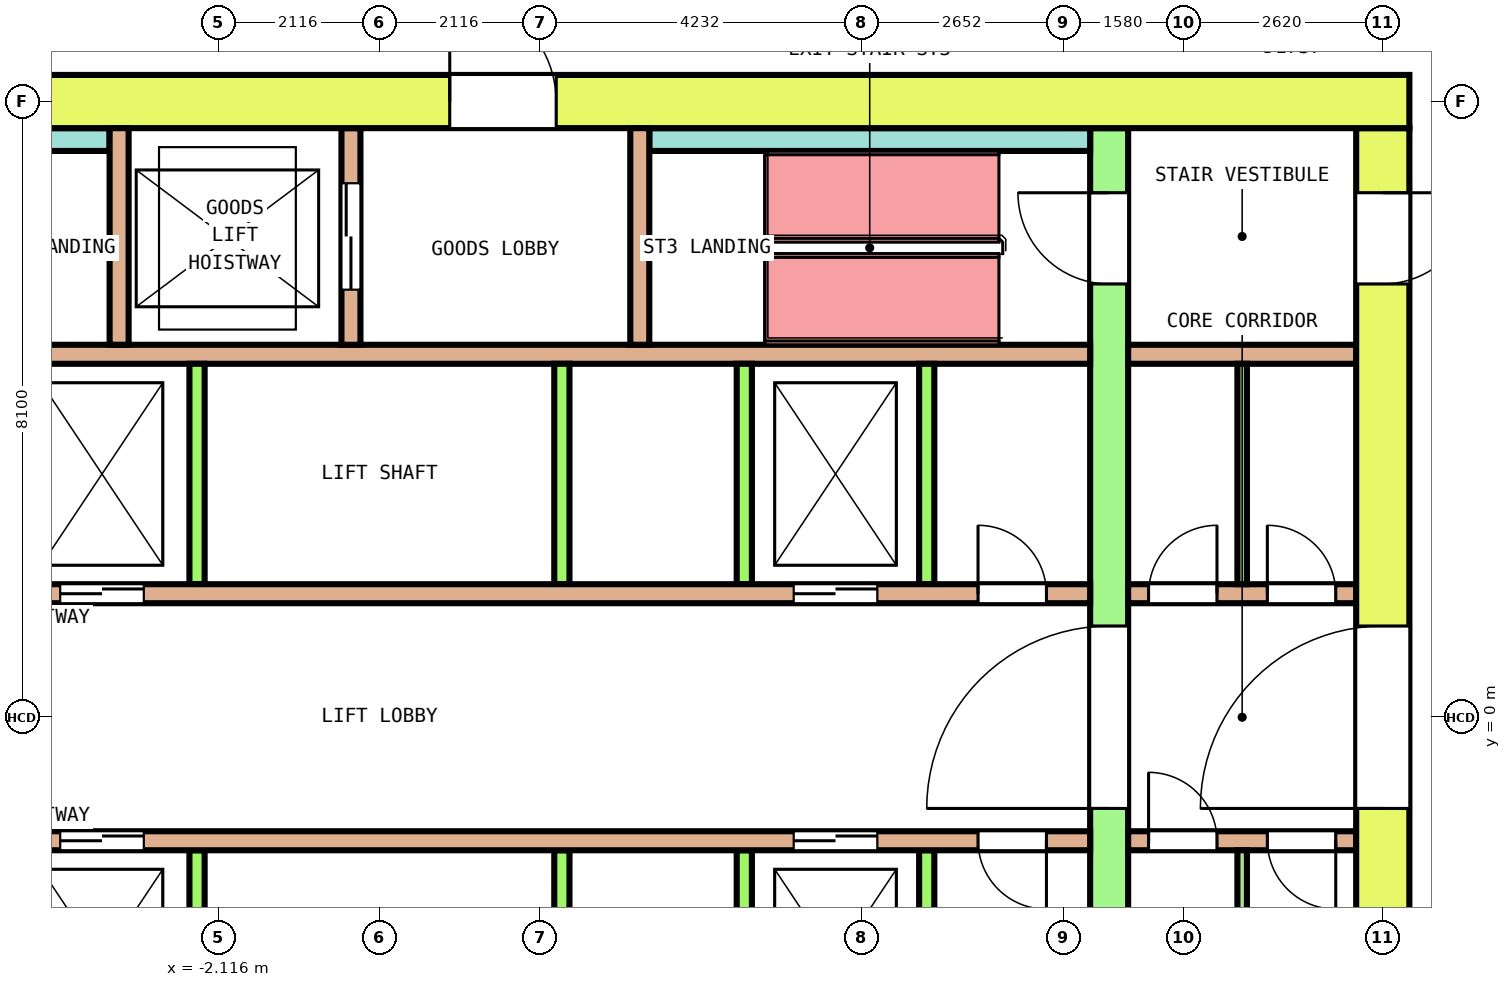
"""IFC4 building model, lengths in metres.
Left out: names, types, materials, properties, quantities, classifications, styles, units other than length and angle.
Written with IfcOpenShell. Run it as: python <this file> out.ifc"""

import sys

from ifc_helpers import new_model, si_unit, direction, frame, frame_2d, origin, place, context, subcontext, project, spatial, rectangle, extrude, element, fill, save


model = new_model("IFC4")
c1 = context("Model", 3, precision=1e-05, world=origin(), true_north=direction((0.0, 1.0)))
c2 = subcontext(c1, "Body", "Model", "MODEL_VIEW")
j1 = project(units=[si_unit("LENGTHUNIT", "METRE"), si_unit("PLANEANGLEUNIT", "RADIAN")], contexts=[c1])
p1 = place(None, origin())
s1 = spatial("IfcSite", under=j1, at=p1, CompositionType="ELEMENT")
p2 = place(p1, origin())
s2 = spatial("IfcBuilding", under=s1, at=p2, CompositionType="ELEMENT")
p3 = place(p2, frame((0.0, 0.0, 158.4)))
s3 = spatial("IfcBuildingStorey", under=s2, at=p3, CompositionType="ELEMENT", Elevation=158.4)
p4 = place(p3, frame((-13.55, 8.1, 0.0), z_axis=(0.0, 0.0, 1.0), x_axis=(1.0, 0.0, 0.0)))
e1 = element("IfcWall", 1, at=p4, inside=s3, PredefinedType="SHEAR", context=c2, shape_type="SweptSolid", body=[
    extrude(rectangle(XDim=27.1, YDim=0.7, at=frame_2d((13.55, 0.0))), origin(), (0.0, 0.0, 1.0), 4.1),
])
p5 = place(p4, frame((14.475, 0.0, 0.0)))
e2 = element("IfcOpeningElement", 2, at=p5, cuts=e1, PredefinedType="OPENING", context=c2, shape_type="SweptSolid", body=[
    extrude(rectangle(XDim=1.4, YDim=2.1, at=frame_2d((0.7, 1.05))), frame((0.0, 0.36, 0.0), z_axis=(0.0, -1.0, 0.0), x_axis=(1.0, 0.0, 0.0)), (0.0, 0.0, 1.0), 0.72),
])
p6 = place(p3, frame((13.2, -7.75, 0.0), z_axis=(0.0, 0.0, 1.0), x_axis=(0.0, 1.0, 0.0)))
e3 = element("IfcWall", 3, at=p6, inside=s3, PredefinedType="SHEAR", context=c2, shape_type="SweptSolid", body=[
    extrude(rectangle(XDim=15.5, YDim=0.7, at=frame_2d((7.75, 0.0))), origin(), (0.0, 0.0, 1.0), 4.1),
])
p7 = place(p6, frame((6.55, 0.0, 0.0)))
e4 = element("IfcOpeningElement", 4, at=p7, cuts=e3, PredefinedType="OPENING", context=c2, shape_type="SweptSolid", body=[
    extrude(rectangle(XDim=2.4, YDim=2.1, at=frame_2d((1.2, 1.05))), frame((0.0, 0.36, 0.0), z_axis=(0.0, -1.0, 0.0), x_axis=(1.0, 0.0, 0.0)), (0.0, 0.0, 1.0), 0.72),
])
p8 = place(p6, frame((13.45, 0.0, 0.0)))
e5 = element("IfcOpeningElement", 5, at=p8, cuts=e3, PredefinedType="OPENING", context=c2, shape_type="SweptSolid", body=[
    extrude(rectangle(XDim=1.2, YDim=2.1, at=frame_2d((0.6, 1.05))), frame((0.0, 0.36, 0.0), z_axis=(0.0, -1.0, 0.0), x_axis=(1.0, 0.0, 0.0)), (0.0, 0.0, 1.0), 0.72),
])
p9 = place(p6, frame((0.95, 0.0, 0.0)))
e6 = element("IfcOpeningElement", 6, at=p9, cuts=e3, PredefinedType="OPENING", context=c2, shape_type="SweptSolid", body=[
    extrude(rectangle(XDim=1.0, YDim=2.1, at=frame_2d((0.5, 1.05))), frame((0.0, 0.36, 0.0), z_axis=(0.0, -1.0, 0.0), x_axis=(1.0, 0.0, 0.0)), (0.0, 0.0, 1.0), 0.72),
])
p10 = place(p3, frame((9.6, -7.75, 0.0), z_axis=(0.0, 0.0, 1.0), x_axis=(0.0, 1.0, 0.0)))
e7 = element("IfcWall", 7, at=p10, inside=s3, PredefinedType="SHEAR", context=c2, shape_type="SweptSolid", body=[
    extrude(rectangle(XDim=15.5, YDim=0.5, at=frame_2d((7.75, 0.0))), origin(), (0.0, 0.0, 1.0), 4.1),
])
p11 = place(p10, frame((6.55, 0.0, 0.0)))
e8 = element("IfcOpeningElement", 8, at=p11, cuts=e7, PredefinedType="OPENING", context=c2, shape_type="SweptSolid", body=[
    extrude(rectangle(XDim=2.4, YDim=2.1, at=frame_2d((1.2, 1.05))), frame((0.0, 0.26, 0.0), z_axis=(0.0, -1.0, 0.0), x_axis=(1.0, 0.0, 0.0)), (0.0, 0.0, 1.0), 0.52),
])
p12 = place(p10, frame((13.45, 0.0, 0.0)))
e9 = element("IfcOpeningElement", 9, at=p12, cuts=e7, PredefinedType="OPENING", context=c2, shape_type="SweptSolid", body=[
    extrude(rectangle(XDim=1.2, YDim=2.1, at=frame_2d((0.6, 1.05))), frame((0.0, 0.26, 0.0), z_axis=(0.0, -1.0, 0.0), x_axis=(1.0, 0.0, 0.0)), (0.0, 0.0, 1.0), 0.52),
])
p13 = place(p10, frame((0.95, 0.0, 0.0)))
e10 = element("IfcOpeningElement", 10, at=p13, cuts=e7, PredefinedType="OPENING", context=c2, shape_type="SweptSolid", body=[
    extrude(rectangle(XDim=1.0, YDim=2.1, at=frame_2d((0.5, 1.05))), frame((0.0, 0.26, 0.0), z_axis=(0.0, -1.0, 0.0), x_axis=(1.0, 0.0, 0.0)), (0.0, 0.0, 1.0), 0.52),
])
p14 = place(p3, frame((-9.35, 1.625, 0.0), z_axis=(0.0, 0.0, 1.0), x_axis=(1.0, 0.0, 0.0)))
e11 = element("IfcWall", 11, at=p14, inside=s3, PredefinedType="SOLIDWALL", context=c2, shape_type="SweptSolid", body=[
    extrude(rectangle(XDim=18.7, YDim=0.25, at=frame_2d((9.35, 0.0))), origin(), (0.0, 0.0, 1.0), 4.1),
])
p15 = place(p14, frame((2.85, 0.0, 0.0)))
e12 = element("IfcOpeningElement", 12, at=p15, cuts=e11, PredefinedType="OPENING", context=c2, shape_type="SweptSolid", body=[
    extrude(rectangle(XDim=1.1, YDim=2.1, at=frame_2d((0.55, 1.05))), frame((0.0, 0.135, 0.0), z_axis=(0.0, -1.0, 0.0), x_axis=(1.0, 0.0, 0.0)), (0.0, 0.0, 1.0), 0.27),
])
p16 = place(p14, frame((5.15, 0.0, 0.0)))
e13 = element("IfcOpeningElement", 13, at=p16, cuts=e11, PredefinedType="OPENING", context=c2, shape_type="SweptSolid", body=[
    extrude(rectangle(XDim=1.1, YDim=2.1, at=frame_2d((0.55, 1.05))), frame((0.0, 0.135, 0.0), z_axis=(0.0, -1.0, 0.0), x_axis=(1.0, 0.0, 0.0)), (0.0, 0.0, 1.0), 0.27),
])
p17 = place(p14, frame((14.8, 0.0, 0.0)))
e14 = element("IfcOpeningElement", 14, at=p17, cuts=e11, PredefinedType="OPENING", context=c2, shape_type="SweptSolid", body=[
    extrude(rectangle(XDim=1.1, YDim=2.1, at=frame_2d((0.55, 1.05))), frame((0.0, 0.135, 0.0), z_axis=(0.0, -1.0, 0.0), x_axis=(1.0, 0.0, 0.0)), (0.0, 0.0, 1.0), 0.27),
])
p18 = place(p14, frame((0.575, 0.0, 0.0)))
e15 = element("IfcOpeningElement", 15, at=p18, cuts=e11, PredefinedType="OPENING", context=c2, shape_type="SweptSolid", body=[
    extrude(rectangle(XDim=0.9, YDim=2.1, at=frame_2d((0.45, 1.05))), frame((0.0, 0.135, 0.0), z_axis=(0.0, -1.0, 0.0), x_axis=(1.0, 0.0, 0.0)), (0.0, 0.0, 1.0), 0.27),
])
p19 = place(p14, frame((17.225, 0.0, 0.0)))
e16 = element("IfcOpeningElement", 16, at=p19, cuts=e11, PredefinedType="OPENING", context=c2, shape_type="SweptSolid", body=[
    extrude(rectangle(XDim=0.9, YDim=2.1, at=frame_2d((0.45, 1.05))), frame((0.0, 0.135, 0.0), z_axis=(0.0, -1.0, 0.0), x_axis=(1.0, 0.0, 0.0)), (0.0, 0.0, 1.0), 0.27),
])
p20 = place(p3, frame((9.85, 1.625, 0.0), z_axis=(0.0, 0.0, 1.0), x_axis=(1.0, 0.0, 0.0)))
e17 = element("IfcWall", 17, at=p20, inside=s3, PredefinedType="SOLIDWALL", context=c2, shape_type="SweptSolid", body=[
    extrude(rectangle(XDim=3.0, YDim=0.25, at=frame_2d((1.5, 0.0))), origin(), (0.0, 0.0, 1.0), 4.1),
])
p21 = place(p20, frame((0.269, 0.0, 0.0)))
e18 = element("IfcOpeningElement", 18, at=p21, cuts=e17, PredefinedType="OPENING", context=c2, shape_type="SweptSolid", body=[
    extrude(rectangle(XDim=0.9, YDim=2.1, at=frame_2d((0.45, 1.05))), frame((0.0, 0.135, 0.0), z_axis=(0.0, -1.0, 0.0), x_axis=(1.0, 0.0, 0.0)), (0.0, 0.0, 1.0), 0.27),
])
p22 = place(p20, frame((1.831, 0.0, 0.0)))
e19 = element("IfcOpeningElement", 19, at=p22, cuts=e17, PredefinedType="OPENING", context=c2, shape_type="SweptSolid", body=[
    extrude(rectangle(XDim=0.9, YDim=2.1, at=frame_2d((0.45, 1.05))), frame((0.0, 0.135, 0.0), z_axis=(0.0, -1.0, 0.0), x_axis=(1.0, 0.0, 0.0)), (0.0, 0.0, 1.0), 0.27),
])
p23 = place(p3, frame((-9.35, 4.775, 0.0), z_axis=(0.0, 0.0, 1.0), x_axis=(1.0, 0.0, 0.0)))
e20 = element("IfcWall", 20, at=p23, inside=s3, PredefinedType="SOLIDWALL", context=c2, shape_type="SweptSolid", body=[
    extrude(rectangle(XDim=18.7, YDim=0.25, at=frame_2d((9.35, 0.0))), origin(), (0.0, 0.0, 1.0), 4.1),
])
p24 = place(p3, frame((9.85, 4.775, 0.0), z_axis=(0.0, 0.0, 1.0), x_axis=(1.0, 0.0, 0.0)))
e21 = element("IfcWall", 21, at=p24, inside=s3, PredefinedType="SOLIDWALL", context=c2, shape_type="SweptSolid", body=[
    extrude(rectangle(XDim=3.0, YDim=0.25, at=frame_2d((1.5, 0.0))), origin(), (0.0, 0.0, 1.0), 4.1),
])
for number, where, z_axis, x_axis in (
    (22, (-2.4, 1.75, 0.0), (0.0, 0.0, 1.0), (0.0, 1.0, 0.0)),
    (23, (2.4, 1.75, 0.0), (0.0, 0.0, 1.0), (0.0, 1.0, 0.0)),
    (24, (4.8, 1.75, 0.0), (0.0, 0.0, 1.0), (0.0, 1.0, 0.0)),
    (25, (7.2, 1.75, 0.0), (0.0, 0.0, 1.0), (0.0, 1.0, 0.0)),
):
    element("IfcWall", number, at=place(p3, frame(where, z_axis=z_axis, x_axis=x_axis)), inside=s3, PredefinedType="SOLIDWALL", context=c2, shape_type="SweptSolid", body=[
        extrude(rectangle(XDim=2.9, YDim=0.2, at=frame_2d((1.45, 0.0))), origin(), (0.0, 0.0, 1.0), 4.1),
    ])
p25 = place(p3, frame((-9.35, -1.625, 0.0), z_axis=(0.0, 0.0, 1.0), x_axis=(1.0, 0.0, 0.0)))
e26 = element("IfcWall", 26, at=p25, inside=s3, PredefinedType="SOLIDWALL", context=c2, shape_type="SweptSolid", body=[
    extrude(rectangle(XDim=18.7, YDim=0.25, at=frame_2d((9.35, 0.0))), origin(), (0.0, 0.0, 1.0), 4.1),
])
p26 = place(p25, frame((2.85, 0.0, 0.0)))
e27 = element("IfcOpeningElement", 27, at=p26, cuts=e26, PredefinedType="OPENING", context=c2, shape_type="SweptSolid", body=[
    extrude(rectangle(XDim=1.1, YDim=2.1, at=frame_2d((0.55, 1.05))), frame((0.0, 0.135, 0.0), z_axis=(0.0, -1.0, 0.0), x_axis=(1.0, 0.0, 0.0)), (0.0, 0.0, 1.0), 0.27),
])
p27 = place(p25, frame((5.15, 0.0, 0.0)))
e28 = element("IfcOpeningElement", 28, at=p27, cuts=e26, PredefinedType="OPENING", context=c2, shape_type="SweptSolid", body=[
    extrude(rectangle(XDim=1.1, YDim=2.1, at=frame_2d((0.55, 1.05))), frame((0.0, 0.135, 0.0), z_axis=(0.0, -1.0, 0.0), x_axis=(1.0, 0.0, 0.0)), (0.0, 0.0, 1.0), 0.27),
])
p28 = place(p25, frame((14.8, 0.0, 0.0)))
e29 = element("IfcOpeningElement", 29, at=p28, cuts=e26, PredefinedType="OPENING", context=c2, shape_type="SweptSolid", body=[
    extrude(rectangle(XDim=1.1, YDim=2.1, at=frame_2d((0.55, 1.05))), frame((0.0, 0.135, 0.0), z_axis=(0.0, -1.0, 0.0), x_axis=(1.0, 0.0, 0.0)), (0.0, 0.0, 1.0), 0.27),
])
p29 = place(p25, frame((0.575, 0.0, 0.0)))
e30 = element("IfcOpeningElement", 30, at=p29, cuts=e26, PredefinedType="OPENING", context=c2, shape_type="SweptSolid", body=[
    extrude(rectangle(XDim=0.9, YDim=2.1, at=frame_2d((0.45, 1.05))), frame((0.0, 0.135, 0.0), z_axis=(0.0, -1.0, 0.0), x_axis=(1.0, 0.0, 0.0)), (0.0, 0.0, 1.0), 0.27),
])
p30 = place(p25, frame((17.225, 0.0, 0.0)))
e31 = element("IfcOpeningElement", 31, at=p30, cuts=e26, PredefinedType="OPENING", context=c2, shape_type="SweptSolid", body=[
    extrude(rectangle(XDim=0.9, YDim=2.1, at=frame_2d((0.45, 1.05))), frame((0.0, 0.135, 0.0), z_axis=(0.0, -1.0, 0.0), x_axis=(1.0, 0.0, 0.0)), (0.0, 0.0, 1.0), 0.27),
])
p31 = place(p3, frame((9.85, -1.625, 0.0), z_axis=(0.0, 0.0, 1.0), x_axis=(1.0, 0.0, 0.0)))
e32 = element("IfcWall", 32, at=p31, inside=s3, PredefinedType="SOLIDWALL", context=c2, shape_type="SweptSolid", body=[
    extrude(rectangle(XDim=3.0, YDim=0.25, at=frame_2d((1.5, 0.0))), origin(), (0.0, 0.0, 1.0), 4.1),
])
p32 = place(p31, frame((0.269, 0.0, 0.0)))
e33 = element("IfcOpeningElement", 33, at=p32, cuts=e32, PredefinedType="OPENING", context=c2, shape_type="SweptSolid", body=[
    extrude(rectangle(XDim=0.9, YDim=2.1, at=frame_2d((0.45, 1.05))), frame((0.0, 0.135, 0.0), z_axis=(0.0, -1.0, 0.0), x_axis=(1.0, 0.0, 0.0)), (0.0, 0.0, 1.0), 0.27),
])
p33 = place(p31, frame((1.831, 0.0, 0.0)))
e34 = element("IfcOpeningElement", 34, at=p33, cuts=e32, PredefinedType="OPENING", context=c2, shape_type="SweptSolid", body=[
    extrude(rectangle(XDim=0.9, YDim=2.1, at=frame_2d((0.45, 1.05))), frame((0.0, 0.135, 0.0), z_axis=(0.0, -1.0, 0.0), x_axis=(1.0, 0.0, 0.0)), (0.0, 0.0, 1.0), 0.27),
])
for number, where, z_axis, x_axis in (
    (35, (-2.4, -4.65, 0.0), (0.0, 0.0, 1.0), (0.0, 1.0, 0.0)),
    (36, (2.4, -4.65, 0.0), (0.0, 0.0, 1.0), (0.0, 1.0, 0.0)),
    (37, (4.8, -4.65, 0.0), (0.0, 0.0, 1.0), (0.0, 1.0, 0.0)),
    (38, (7.2, -4.65, 0.0), (0.0, 0.0, 1.0), (0.0, 1.0, 0.0)),
):
    element("IfcWall", number, at=place(p3, frame(where, z_axis=z_axis, x_axis=x_axis)), inside=s3, PredefinedType="SOLIDWALL", context=c2, shape_type="SweptSolid", body=[
        extrude(rectangle(XDim=2.9, YDim=0.2, at=frame_2d((1.45, 0.0))), origin(), (0.0, 0.0, 1.0), 4.1),
    ])
for number, where, z_axis, x_axis in (
    (39, (-9.35, 7.6, 0.0), (0.0, 0.0, 1.0), (1.0, 0.0, 0.0)),
    (40, (3.55, 7.6, 0.0), (0.0, 0.0, 1.0), (1.0, 0.0, 0.0)),
):
    element("IfcWall", number, at=place(p3, frame(where, z_axis=z_axis, x_axis=x_axis)), inside=s3, PredefinedType="SOLIDWALL", context=c2, shape_type="SweptSolid", body=[
        extrude(rectangle(XDim=5.8, YDim=0.3, at=frame_2d((2.9, 0.0))), origin(), (0.0, 0.0, 1.0), 4.1),
    ])
p34 = place(p3, frame((-3.425, 4.9, 0.0), z_axis=(0.0, 0.0, 1.0), x_axis=(0.0, 1.0, 0.0)))
e41 = element("IfcWall", 41, at=p34, inside=s3, PredefinedType="SOLIDWALL", context=c2, shape_type="SweptSolid", body=[
    extrude(rectangle(XDim=2.85, YDim=0.25, at=frame_2d((1.425, 0.0))), origin(), (0.0, 0.0, 1.0), 4.1),
])
p35 = place(p3, frame((-0.375, 4.9, 0.0), z_axis=(0.0, 0.0, 1.0), x_axis=(0.0, 1.0, 0.0)))
e42 = element("IfcWall", 42, at=p35, inside=s3, PredefinedType="SOLIDWALL", context=c2, shape_type="SweptSolid", body=[
    extrude(rectangle(XDim=2.85, YDim=0.25, at=frame_2d((1.425, 0.0))), origin(), (0.0, 0.0, 1.0), 4.1),
])
p36 = place(p35, frame((0.725, 0.0, 0.0)))
e43 = element("IfcOpeningElement", 43, at=p36, cuts=e42, PredefinedType="OPENING", context=c2, shape_type="SweptSolid", body=[
    extrude(rectangle(XDim=1.4, YDim=2.1, at=frame_2d((0.7, 1.05))), frame((0.0, 0.135, 0.0), z_axis=(0.0, -1.0, 0.0), x_axis=(1.0, 0.0, 0.0)), (0.0, 0.0, 1.0), 0.27),
])
p37 = place(p3, frame((3.425, 4.9, 0.0), z_axis=(0.0, 0.0, 1.0), x_axis=(0.0, 1.0, 0.0)))
e44 = element("IfcWall", 44, at=p37, inside=s3, PredefinedType="SOLIDWALL", context=c2, shape_type="SweptSolid", body=[
    extrude(rectangle(XDim=2.85, YDim=0.25, at=frame_2d((1.425, 0.0))), origin(), (0.0, 0.0, 1.0), 4.1),
])
for number, where, z_axis, x_axis in (
    (45, (11.35, 1.75, 0.0), (0.0, 0.0, 1.0), (0.0, 1.0, 0.0)),
    (46, (11.35, -4.65, 0.0), (0.0, 0.0, 1.0), (0.0, 1.0, 0.0)),
):
    element("IfcWall", number, at=place(p3, frame(where, z_axis=z_axis, x_axis=x_axis)), inside=s3, PredefinedType="PARTITIONING", context=c2, shape_type="SweptSolid", body=[
        extrude(rectangle(XDim=2.9, YDim=0.125, at=frame_2d((1.45, 0.0))), origin(), (0.0, 0.0, 1.0), 4.1),
    ])
p38 = place(p16, origin())
e47 = element("IfcDoor", 47, at=p38, inside=s3, OperationType="DOUBLE_DOOR_SLIDING", PredefinedType="DOOR", context=c2, shape_type="SweptSolid", body=[
    extrude(rectangle(XDim=1.1, YDim=2.1, at=frame_2d((0.55, 1.05))), frame((0.0, 0.075, 0.0), z_axis=(0.0, -1.0, 0.0), x_axis=(1.0, 0.0, 0.0)), (0.0, 0.0, 1.0), 0.15),
])
fill(e13, e47)
p39 = place(p17, origin())
e48 = element("IfcDoor", 48, at=p39, inside=s3, OperationType="DOUBLE_DOOR_SLIDING", PredefinedType="DOOR", context=c2, shape_type="SweptSolid", body=[
    extrude(rectangle(XDim=1.1, YDim=2.1, at=frame_2d((0.55, 1.05))), frame((0.0, 0.075, 0.0), z_axis=(0.0, -1.0, 0.0), x_axis=(1.0, 0.0, 0.0)), (0.0, 0.0, 1.0), 0.15),
])
fill(e14, e48)
p40 = place(p27, origin())
e49 = element("IfcDoor", 49, at=p40, inside=s3, OperationType="DOUBLE_DOOR_SLIDING", PredefinedType="DOOR", context=c2, shape_type="SweptSolid", body=[
    extrude(rectangle(XDim=1.1, YDim=2.1, at=frame_2d((0.55, 1.05))), frame((0.0, 0.075, 0.0), z_axis=(0.0, -1.0, 0.0), x_axis=(1.0, 0.0, 0.0)), (0.0, 0.0, 1.0), 0.15),
])
fill(e28, e49)
p41 = place(p28, origin())
e50 = element("IfcDoor", 50, at=p41, inside=s3, OperationType="DOUBLE_DOOR_SLIDING", PredefinedType="DOOR", context=c2, shape_type="SweptSolid", body=[
    extrude(rectangle(XDim=1.1, YDim=2.1, at=frame_2d((0.55, 1.05))), frame((0.0, 0.075, 0.0), z_axis=(0.0, -1.0, 0.0), x_axis=(1.0, 0.0, 0.0)), (0.0, 0.0, 1.0), 0.15),
])
fill(e29, e50)
p42 = place(p36, origin())
e51 = element("IfcDoor", 51, at=p42, inside=s3, OperationType="DOUBLE_DOOR_SLIDING", PredefinedType="DOOR", context=c2, shape_type="SweptSolid", body=[
    extrude(rectangle(XDim=1.4, YDim=2.1, at=frame_2d((0.7, 1.05))), frame((0.0, 0.075, 0.0), z_axis=(0.0, -1.0, 0.0), x_axis=(1.0, 0.0, 0.0)), (0.0, 0.0, 1.0), 0.15),
])
fill(e43, e51)
p43 = place(p11, origin())
e52 = element("IfcDoor", 52, at=p43, inside=s3, OperationType="DOUBLE_DOOR_SINGLE_SWING", PredefinedType="DOOR", context=c2, shape_type="SweptSolid", body=[
    extrude(rectangle(XDim=2.4, YDim=2.1, at=frame_2d((1.2, 1.05))), frame((0.0, 0.2, 0.0), z_axis=(0.0, -1.0, 0.0), x_axis=(1.0, 0.0, 0.0)), (0.0, 0.0, 1.0), 0.4),
])
fill(e8, e52)
p44 = place(p7, origin())
e53 = element("IfcDoor", 53, at=p44, inside=s3, OperationType="DOUBLE_DOOR_SINGLE_SWING", PredefinedType="DOOR", context=c2, shape_type="SweptSolid", body=[
    extrude(rectangle(XDim=2.4, YDim=2.1, at=frame_2d((1.2, 1.05))), frame((0.0, 0.3, 0.0), z_axis=(0.0, -1.0, 0.0), x_axis=(1.0, 0.0, 0.0)), (0.0, 0.0, 1.0), 0.6),
])
fill(e4, e53)
p45 = place(p12, origin())
e54 = element("IfcDoor", 54, at=p45, inside=s3, OperationType="SINGLE_SWING_LEFT", PredefinedType="DOOR", context=c2, shape_type="SweptSolid", body=[
    extrude(rectangle(XDim=1.2, YDim=2.1, at=frame_2d((0.6, 1.05))), frame((0.0, 0.2, 0.0), z_axis=(0.0, -1.0, 0.0), x_axis=(1.0, 0.0, 0.0)), (0.0, 0.0, 1.0), 0.4),
])
fill(e9, e54)
p46 = place(p8, origin())
e55 = element("IfcDoor", 55, at=p46, inside=s3, OperationType="SINGLE_SWING_RIGHT", PredefinedType="DOOR", context=c2, shape_type="SweptSolid", body=[
    extrude(rectangle(XDim=1.2, YDim=2.1, at=frame_2d((0.6, 1.05))), frame((0.0, 0.3, 0.0), z_axis=(0.0, -1.0, 0.0), x_axis=(1.0, 0.0, 0.0)), (0.0, 0.0, 1.0), 0.6),
])
fill(e5, e55)
p47 = place(p5, origin())
e56 = element("IfcDoor", 56, at=p47, inside=s3, OperationType="DOUBLE_DOOR_SINGLE_SWING", PredefinedType="DOOR", context=c2, shape_type="SweptSolid", body=[
    extrude(rectangle(XDim=1.4, YDim=2.1, at=frame_2d((0.7, 1.05))), frame((0.0, 0.3, 0.0), z_axis=(0.0, -1.0, 0.0), x_axis=(1.0, 0.0, 0.0)), (0.0, 0.0, 1.0), 0.6),
])
fill(e2, e56)
p48 = place(p19, origin())
e57 = element("IfcDoor", 57, at=p48, inside=s3, OperationType="SINGLE_SWING_RIGHT", PredefinedType="DOOR", context=c2, shape_type="SweptSolid", body=[
    extrude(rectangle(XDim=0.9, YDim=2.1, at=frame_2d((0.45, 1.05))), frame((0.0, 0.075, 0.0), z_axis=(0.0, -1.0, 0.0), x_axis=(1.0, 0.0, 0.0)), (0.0, 0.0, 1.0), 0.15),
])
fill(e16, e57)
p49 = place(p21, origin())
e58 = element("IfcDoor", 58, at=p49, inside=s3, OperationType="SINGLE_SWING_LEFT", PredefinedType="DOOR", context=c2, shape_type="SweptSolid", body=[
    extrude(rectangle(XDim=0.9, YDim=2.1, at=frame_2d((0.45, 1.05))), frame((0.0, 0.075, 0.0), z_axis=(0.0, -1.0, 0.0), x_axis=(1.0, 0.0, 0.0)), (0.0, 0.0, 1.0), 0.15),
])
fill(e18, e58)
p50 = place(p22, origin())
e59 = element("IfcDoor", 59, at=p50, inside=s3, OperationType="SINGLE_SWING_RIGHT", PredefinedType="DOOR", context=c2, shape_type="SweptSolid", body=[
    extrude(rectangle(XDim=0.9, YDim=2.1, at=frame_2d((0.45, 1.05))), frame((0.0, 0.075, 0.0), z_axis=(0.0, -1.0, 0.0), x_axis=(1.0, 0.0, 0.0)), (0.0, 0.0, 1.0), 0.15),
])
fill(e19, e59)
p51 = place(p30, origin())
e60 = element("IfcDoor", 60, at=p51, inside=s3, OperationType="SINGLE_SWING_RIGHT", PredefinedType="DOOR", context=c2, shape_type="SweptSolid", body=[
    extrude(rectangle(XDim=0.9, YDim=2.1, at=frame_2d((0.45, 1.05))), frame((0.0, 0.075, 0.0), z_axis=(0.0, -1.0, 0.0), x_axis=(1.0, 0.0, 0.0)), (0.0, 0.0, 1.0), 0.15),
])
fill(e31, e60)
p52 = place(p32, origin())
e61 = element("IfcDoor", 61, at=p52, inside=s3, OperationType="SINGLE_SWING_LEFT", PredefinedType="DOOR", context=c2, shape_type="SweptSolid", body=[
    extrude(rectangle(XDim=0.9, YDim=2.1, at=frame_2d((0.45, 1.05))), frame((0.0, 0.075, 0.0), z_axis=(0.0, -1.0, 0.0), x_axis=(1.0, 0.0, 0.0)), (0.0, 0.0, 1.0), 0.15),
])
fill(e33, e61)
p53 = place(p33, origin())
e62 = element("IfcDoor", 62, at=p53, inside=s3, OperationType="SINGLE_SWING_RIGHT", PredefinedType="DOOR", context=c2, shape_type="SweptSolid", body=[
    extrude(rectangle(XDim=0.9, YDim=2.1, at=frame_2d((0.45, 1.05))), frame((0.0, 0.075, 0.0), z_axis=(0.0, -1.0, 0.0), x_axis=(1.0, 0.0, 0.0)), (0.0, 0.0, 1.0), 0.15),
])
fill(e34, e62)
save(model, sys.argv[1])
